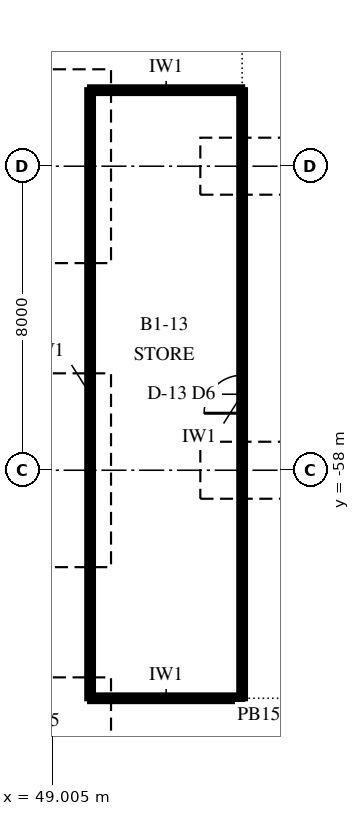
"""IFC4 building model, lengths in metres.
Left out: names, types, materials, properties, quantities, classifications, styles, units other than length and angle.
Written with IfcOpenShell. Run it as: python <this file> out.ifc"""

import sys

from ifc_helpers import new_model, si_unit, direction, frame, frame_2d, origin, place, context, subcontext, project, spatial, rectangle, extrude, element, fill, save


model = new_model("IFC4")
c1 = context("Model", 3, precision=1e-05, world=origin(), true_north=direction((0.0, 1.0)))
c2 = subcontext(c1, "Body", "Model", "MODEL_VIEW")
j1 = project(units=[si_unit("LENGTHUNIT", "METRE"), si_unit("PLANEANGLEUNIT", "RADIAN")], contexts=[c1])
p1 = place(None, origin())
s1 = spatial("IfcSite", under=j1, at=p1, CompositionType="ELEMENT")
p2 = place(p1, origin())
s2 = spatial("IfcBuilding", under=s1, at=p2, CompositionType="ELEMENT")
p3 = place(p2, frame((0.0, 0.0, -7.0)))
s3 = spatial("IfcBuildingStorey", under=s2, at=p3, CompositionType="ELEMENT", Elevation=-7.0)
p4 = place(p3, frame((50.0, -64.0, 0.0), z_axis=(0.0, 0.0, 1.0), x_axis=(0.0, 1.0, 0.0)))
e1 = element("IfcWall", 1, at=p4, inside=s3, PredefinedType="PARTITIONING", context=c2, shape_type="SweptSolid", body=[
    extrude(rectangle(XDim=16.0, YDim=0.15, at=frame_2d((8.0, 0.0))), origin(), (0.0, 0.0, 1.0), 6.7),
])
p5 = place(p3, frame((54.0, -64.0, 0.0), z_axis=(0.0, 0.0, 1.0), x_axis=(0.0, 1.0, 0.0)))
e2 = element("IfcWall", 2, at=p5, inside=s3, PredefinedType="PARTITIONING", context=c2, shape_type="SweptSolid", body=[
    extrude(rectangle(XDim=16.0, YDim=0.15, at=frame_2d((8.0, 0.0))), origin(), (0.0, 0.0, 1.0), 6.7),
])
p6 = place(p5, frame((7.5, 0.0, 0.0)))
e3 = element("IfcOpeningElement", 3, at=p6, cuts=e2, PredefinedType="OPENING", context=c2, shape_type="SweptSolid", body=[
    extrude(rectangle(XDim=1.0, YDim=2.1, at=frame_2d((0.5, 1.05))), frame((0.0, 0.09, 0.0), z_axis=(0.0, -1.0, 0.0), x_axis=(1.0, 0.0, 0.0)), (0.0, 0.0, 1.0), 0.18),
])
for number, where, z_axis, x_axis in (
    (4, (50.0, -64.0, 0.0), (0.0, 0.0, 1.0), (1.0, 0.0, 0.0)),
    (5, (50.0, -48.0, 0.0), (0.0, 0.0, 1.0), (1.0, 0.0, 0.0)),
):
    element("IfcWall", number, at=place(p3, frame(where, z_axis=z_axis, x_axis=x_axis)), inside=s3, PredefinedType="PARTITIONING", context=c2, shape_type="SweptSolid", body=[
        extrude(rectangle(XDim=4.0, YDim=0.15, at=frame_2d((2.0, 0.0))), origin(), (0.0, 0.0, 1.0), 6.7),
    ])
p7 = place(p6, origin())
e6 = element("IfcDoor", 6, at=p7, inside=s3, OperationType="SINGLE_SWING_LEFT", PredefinedType="DOOR", context=c2, shape_type="SweptSolid", body=[
    extrude(rectangle(XDim=1.0, YDim=2.1, at=frame_2d((0.5, 1.05))), frame((0.0, 0.075, 0.0), z_axis=(0.0, -1.0, 0.0), x_axis=(1.0, 0.0, 0.0)), (0.0, 0.0, 1.0), 0.149),
])
fill(e3, e6)
save(model, sys.argv[1])
